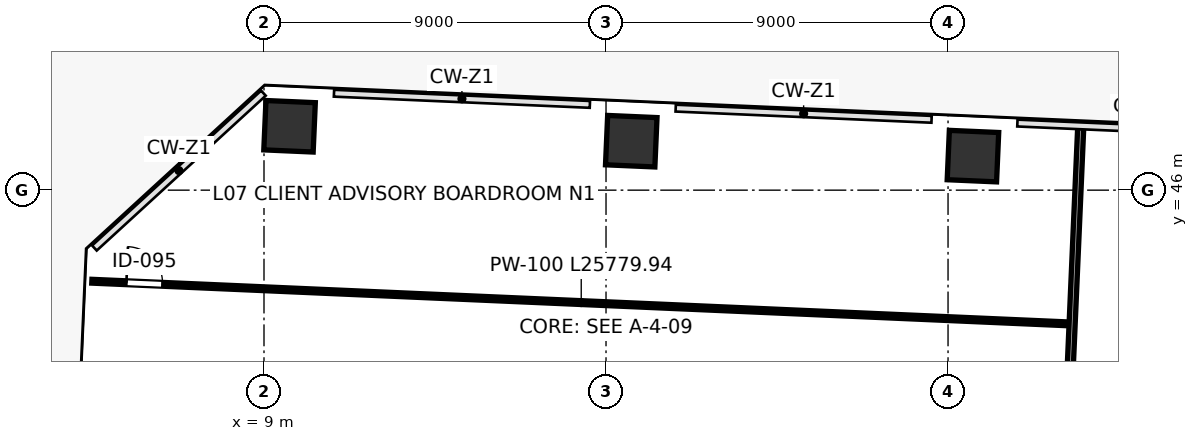
"""IFC4 building model, lengths in metres.
Left out: names, types, materials, properties, quantities, classifications, styles, units other than length and angle.
Written with IfcOpenShell. Run it as: python <this file> out.ifc"""

import sys

from ifc_helpers import new_model, si_unit, direction, frame, frame_2d, origin, origin_2d, place, context, subcontext, project, spatial, rectangle, extrude, source, transform, mapped, element, fill, save


model = new_model("IFC4")
c1 = context("Model", 3, precision=1e-05, world=origin(), true_north=direction((0.0, 1.0)))
c2 = subcontext(c1, "Body", "Model", "MODEL_VIEW")
j1 = project(units=[si_unit("LENGTHUNIT", "METRE"), si_unit("PLANEANGLEUNIT", "RADIAN")], contexts=[c1])
p1 = place(None, origin())
s1 = spatial("IfcSite", under=j1, at=p1, CompositionType="ELEMENT")
p2 = place(p1, origin())
s2 = spatial("IfcBuilding", under=s1, at=p2, CompositionType="ELEMENT")
p3 = place(p2, frame((0.0, 0.0, 32.8)))
s3 = spatial("IfcBuildingStorey", under=s2, at=p3, CompositionType="ELEMENT", Elevation=32.8)
m1 = source(origin(), c2, "Body", "SweptSolid", [
    extrude(rectangle(XDim=1.3, YDim=1.3, at=origin_2d()), origin(), (0.0, 0.0, 1.0), 4.799),
])
for number, where, z_axis, x_axis in (
    (1, (9.673, 47.681, 0.001), (0.0, 0.0, 1.0), (-0.999, 0.044, 0.0)),
    (2, (18.664, 47.288, 0.001), (0.0, 0.0, 1.0), (-0.999, 0.044, 0.0)),
    (3, (27.656, 46.896, 0.001), (0.0, 0.0, 1.0), (-0.999, 0.044, 0.0)),
):
    element("IfcColumn", number, at=place(p3, frame(where, z_axis=z_axis, x_axis=x_axis)), inside=s3, PredefinedType="COLUMN", context=c2, shape_type="MappedRepresentation", body=[
        mapped(m1, transform((0.0, 0.0, 0.0), scale=1.0)),
    ])
p4 = place(p3, frame((4.47, 43.604, 0.0), z_axis=(0.0, 0.0, 1.0), x_axis=(0.999047795436, -0.04362914662, 0.0)))
e4 = element("IfcWall", 4, at=p4, inside=s3, PredefinedType="PARTITIONING", context=c2, shape_type="SweptSolid", body=[
    extrude(rectangle(XDim=25.78, YDim=0.1, at=frame_2d((12.89, 0.0))), origin(), (0.0, 0.0, 1.0), 4.56),
])
p5 = place(p4, frame((0.91, 0.0, 0.0)))
e5 = element("IfcOpeningElement", 5, at=p5, cuts=e4, PredefinedType="OPENING", context=c2, shape_type="SweptSolid", body=[
    extrude(rectangle(XDim=0.95, YDim=2.15, at=frame_2d((0.475, 1.075))), frame((0.0, 0.06, 0.0), z_axis=(0.0, -1.0, 0.0), x_axis=(1.0, 0.0, 0.0)), (0.0, 0.0, 1.0), 0.12),
])
p6 = place(p3, frame((29.625, 27.822, 0.0), z_axis=(0.0, 0.0, 1.0), x_axis=(0.043623060059, 0.999048061222, 0.0)))
e6 = element("IfcWall", 6, at=p6, inside=s3, PredefinedType="PARTITIONING", context=c2, shape_type="SweptSolid", body=[
    extrude(rectangle(XDim=19.84, YDim=0.16, at=frame_2d((9.92, 0.0))), origin(), (0.0, 0.0, 1.0), 3.695),
])
m2 = source(origin(), c2, "Body", "SweptSolid", [
    extrude(rectangle(XDim=0.95, YDim=2.15, at=frame_2d((0.475, 1.075))), frame((0.0, 0.025, 0.0), z_axis=(0.0, -1.0, 0.0), x_axis=(1.0, 0.0, 0.0)), (0.0, 0.0, 1.0), 0.05),
])
p7 = place(p5, origin())
e7 = element("IfcDoor", 7, at=p7, inside=s3, OperationType="SINGLE_SWING_LEFT", PredefinedType="DOOR", context=c2, shape_type="MappedRepresentation", body=[
    mapped(m2, transform((0.0, 0.0, 0.0), scale=1.0)),
])
fill(e5, e7)
save(model, sys.argv[1])
